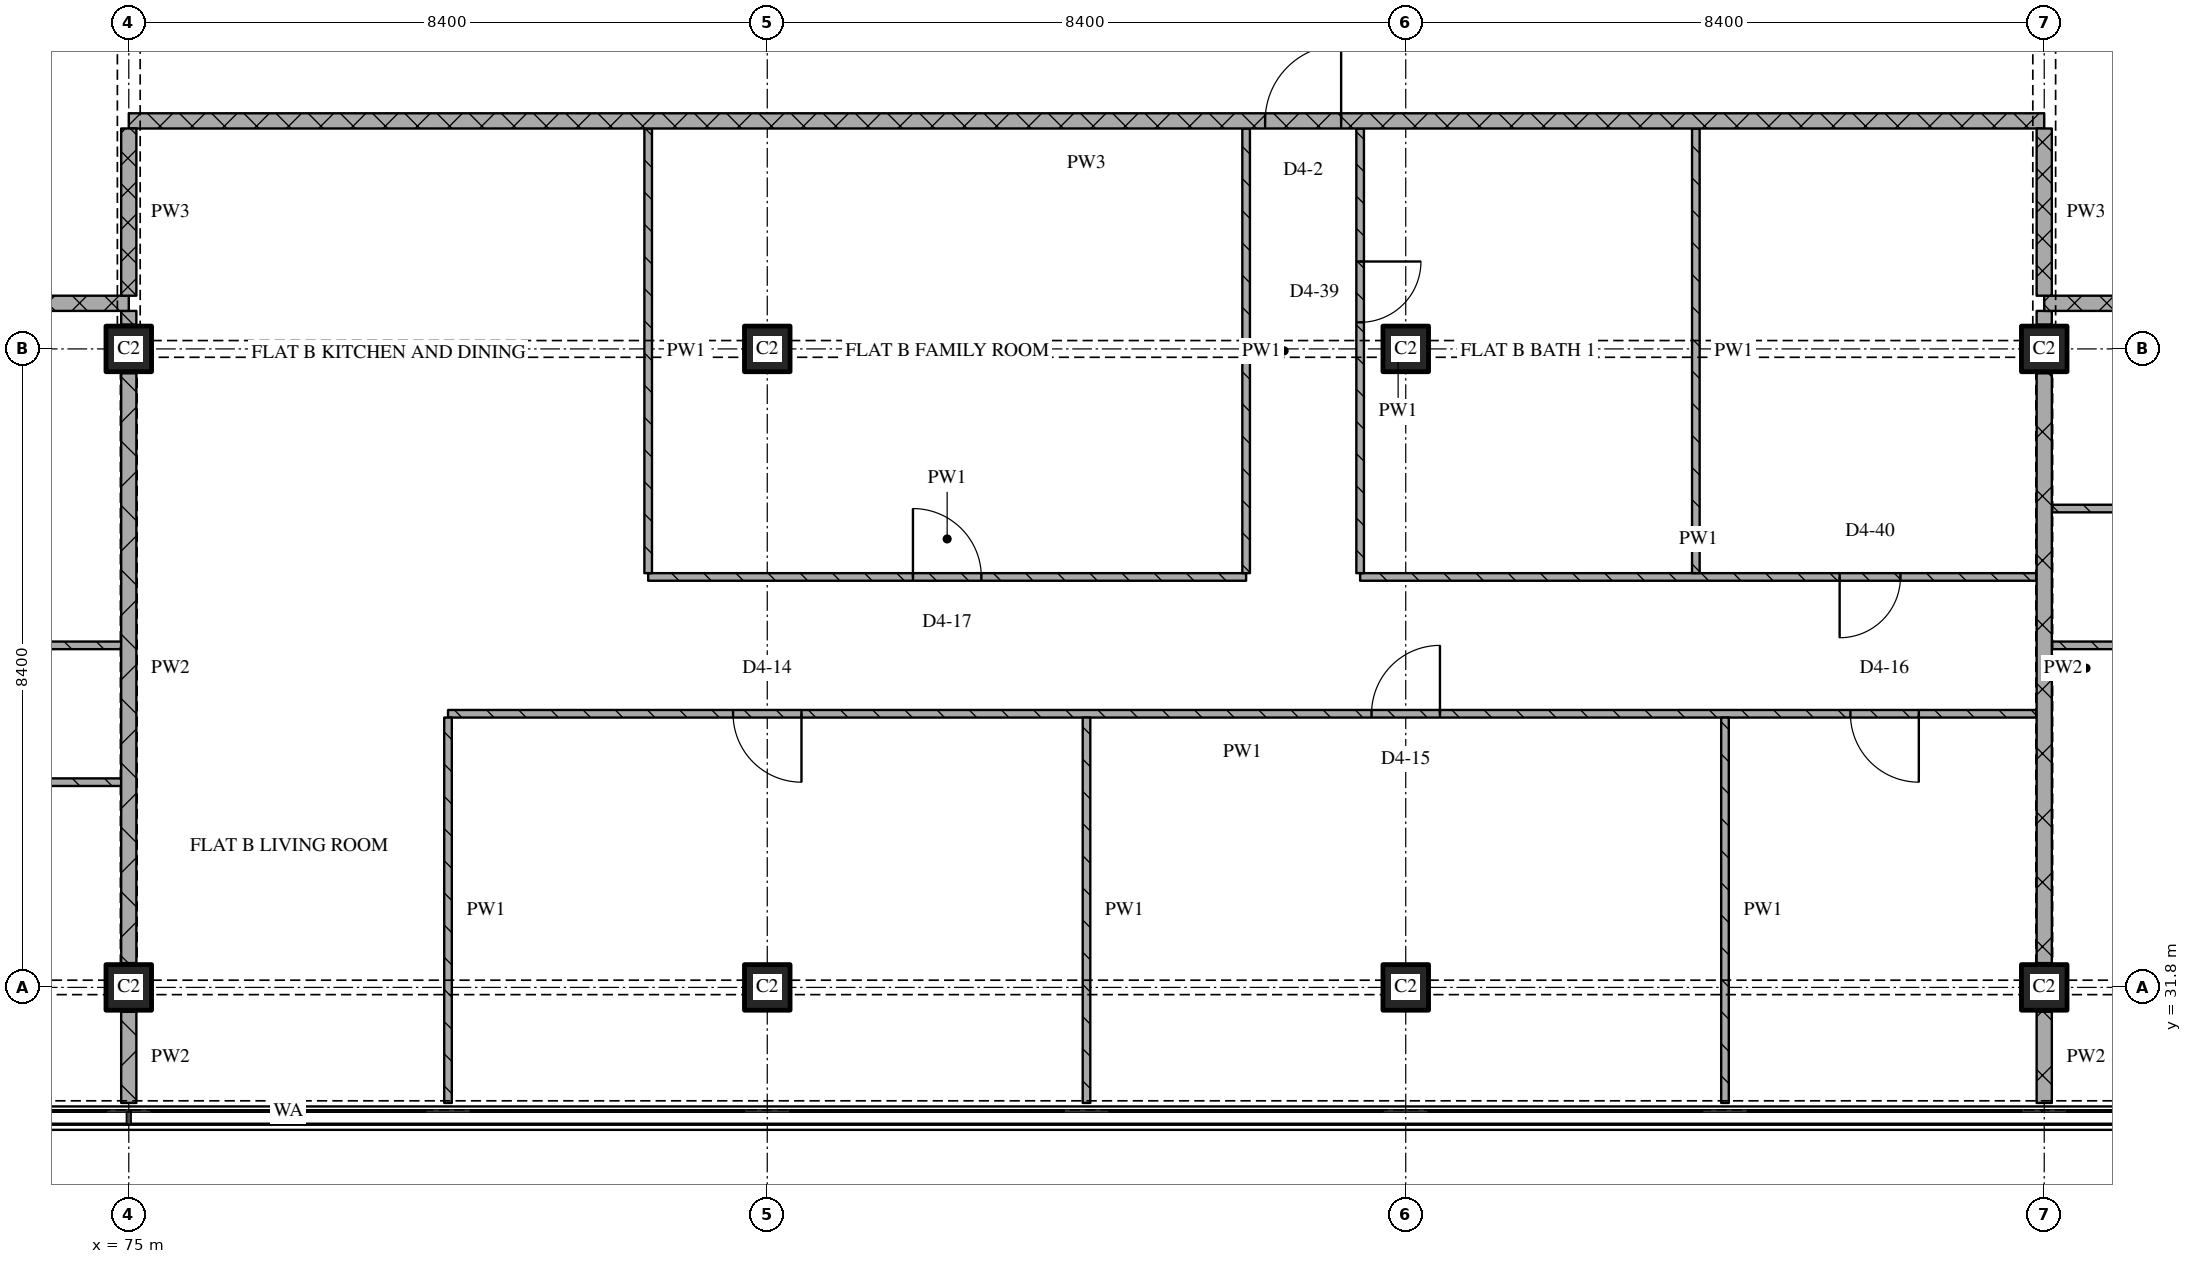
"""IFC4 building model, lengths in metres.
Left out: names, types, materials, properties, quantities, classifications, styles, units other than length and angle.
Written with IfcOpenShell. Run it as: python <this file> out.ifc"""

import sys

from ifc_helpers import new_model, si_unit, direction, frame, frame_2d, origin, origin_2d, place, context, subcontext, project, spatial, rectangle, extrude, element, fill, save


model = new_model("IFC4")
c1 = context("Model", 3, precision=1e-05, world=origin(), true_north=direction((0.0, 1.0)))
c2 = subcontext(c1, "Body", "Model", "MODEL_VIEW")
j1 = project(units=[si_unit("LENGTHUNIT", "METRE"), si_unit("PLANEANGLEUNIT", "RADIAN")], contexts=[c1])
p1 = place(None, origin())
s1 = spatial("IfcSite", under=j1, at=p1, CompositionType="ELEMENT")
p2 = place(p1, origin())
s2 = spatial("IfcBuilding", under=s1, at=p2, CompositionType="ELEMENT")
p3 = place(p2, frame((0.0, 0.0, 237.9)))
s3 = spatial("IfcBuildingStorey", under=s2, at=p3, CompositionType="ELEMENT", Elevation=237.9)
for number, where, z_axis, x_axis in (
    (1, (75.0, 31.8, 0.0), (0.0, 0.0, 1.0), (1.0, 0.0, 0.0)),
    (2, (75.0, 40.2, 0.0), (0.0, 0.0, 1.0), (1.0, 0.0, 0.0)),
    (3, (83.4, 31.8, 0.0), (0.0, 0.0, 1.0), (1.0, 0.0, 0.0)),
    (4, (83.4, 40.2, 0.0), (0.0, 0.0, 1.0), (1.0, 0.0, 0.0)),
    (5, (91.8, 31.8, 0.0), (0.0, 0.0, 1.0), (1.0, 0.0, 0.0)),
    (6, (91.8, 40.2, 0.0), (0.0, 0.0, 1.0), (1.0, 0.0, 0.0)),
    (7, (100.2, 31.8, 0.0), (0.0, 0.0, 1.0), (1.0, 0.0, 0.0)),
    (8, (100.2, 40.2, 0.0), (0.0, 0.0, 1.0), (1.0, 0.0, 0.0)),
):
    element("IfcColumn", number, at=place(p3, frame(where, z_axis=z_axis, x_axis=x_axis)), inside=s3, PredefinedType="COLUMN", context=c2, shape_type="SweptSolid", body=[
        extrude(rectangle(XDim=0.6, YDim=0.6, at=origin_2d()), origin(), (0.0, 0.0, 1.0), 3.6),
    ])
p4 = place(p3, frame((74.9, 34.5, 0.0), z_axis=(0.0, 0.0, 1.0), x_axis=(-1.0, 0.0, 0.0)))
e9 = element("IfcWall", 9, at=p4, inside=s3, PredefinedType="PARTITIONING", context=c2, shape_type="SweptSolid", body=[
    extrude(rectangle(XDim=16.7, YDim=0.1, at=frame_2d((8.35, 0.0))), origin(), (0.0, 0.0, 1.0), 3.32),
])
p5 = place(p4, frame((3.65, 0.0, 0.0)))
e10 = element("IfcOpeningElement", 10, at=p5, cuts=e9, PredefinedType="OPENING", context=c2, shape_type="SweptSolid", body=[
    extrude(rectangle(XDim=0.9, YDim=2.1, at=frame_2d((0.45, 1.05))), frame((0.0, 0.06, 0.0), z_axis=(0.0, -1.0, 0.0), x_axis=(1.0, 0.0, 0.0)), (0.0, 0.0, 1.0), 0.12),
])
p6 = place(p4, frame((12.05, 0.0, 0.0)))
e11 = element("IfcOpeningElement", 11, at=p6, cuts=e9, PredefinedType="OPENING", context=c2, shape_type="SweptSolid", body=[
    extrude(rectangle(XDim=0.9, YDim=2.1, at=frame_2d((0.45, 1.05))), frame((0.0, 0.06, 0.0), z_axis=(0.0, -1.0, 0.0), x_axis=(1.0, 0.0, 0.0)), (0.0, 0.0, 1.0), 0.12),
])
p7 = place(p3, frame((100.1, 35.4, 0.0), z_axis=(0.0, 0.0, 1.0), x_axis=(-1.0, 0.0, 0.0)))
e12 = element("IfcWall", 12, at=p7, inside=s3, PredefinedType="PARTITIONING", context=c2, shape_type="SweptSolid", body=[
    extrude(rectangle(XDim=20.9, YDim=0.1, at=frame_2d((10.45, 0.0))), origin(), (0.0, 0.0, 1.0), 3.32),
])
p8 = place(p7, frame((1.55, 0.0, 0.0)))
e13 = element("IfcOpeningElement", 13, at=p8, cuts=e12, PredefinedType="OPENING", context=c2, shape_type="SweptSolid", body=[
    extrude(rectangle(XDim=0.9, YDim=2.1, at=frame_2d((0.45, 1.05))), frame((0.0, 0.06, 0.0), z_axis=(0.0, -1.0, 0.0), x_axis=(1.0, 0.0, 0.0)), (0.0, 0.0, 1.0), 0.12),
])
p9 = place(p7, frame((7.85, 0.0, 0.0)))
e14 = element("IfcOpeningElement", 14, at=p9, cuts=e12, PredefinedType="OPENING", context=c2, shape_type="SweptSolid", body=[
    extrude(rectangle(XDim=0.9, YDim=2.1, at=frame_2d((0.45, 1.05))), frame((0.0, 0.06, 0.0), z_axis=(0.0, -1.0, 0.0), x_axis=(1.0, 0.0, 0.0)), (0.0, 0.0, 1.0), 0.12),
])
p10 = place(p7, frame((16.25, 0.0, 0.0)))
e15 = element("IfcOpeningElement", 15, at=p10, cuts=e12, PredefinedType="OPENING", context=c2, shape_type="SweptSolid", body=[
    extrude(rectangle(XDim=0.9, YDim=2.1, at=frame_2d((0.45, 1.05))), frame((0.0, 0.06, 0.0), z_axis=(0.0, -1.0, 0.0), x_axis=(1.0, 0.0, 0.0)), (0.0, 0.0, 1.0), 0.12),
])
p11 = place(p3, frame((65.1, 36.3, 0.0), z_axis=(0.0, 0.0, 1.0), x_axis=(1.0, 0.0, 0.0)))
e16 = element("IfcWall", 16, at=p11, inside=s3, PredefinedType="PARTITIONING", context=c2, shape_type="SweptSolid", body=[
    extrude(rectangle(XDim=9.8, YDim=0.1, at=frame_2d((4.9, 0.0))), origin(), (0.0, 0.0, 1.0), 3.32),
])
p12 = place(p11, frame((6.8, 0.0, 0.0)))
e17 = element("IfcOpeningElement", 17, at=p12, cuts=e16, PredefinedType="OPENING", context=c2, shape_type="SweptSolid", body=[
    extrude(rectangle(XDim=0.8, YDim=2.1, at=frame_2d((0.4, 1.05))), frame((0.0, 0.06, 0.0), z_axis=(0.0, -1.0, 0.0), x_axis=(1.0, 0.0, 0.0)), (0.0, 0.0, 1.0), 0.12),
])
p13 = place(p3, frame((112.8, 36.3, 0.0), z_axis=(0.0, 0.0, 1.0), x_axis=(-1.0, 0.0, 0.0)))
e18 = element("IfcWall", 18, at=p13, inside=s3, PredefinedType="PARTITIONING", context=c2, shape_type="SweptSolid", body=[
    extrude(rectangle(XDim=12.5, YDim=0.1, at=frame_2d((6.25, 0.0))), origin(), (0.0, 0.0, 1.0), 3.32),
])
p14 = place(p13, frame((10.05, 0.0, 0.0)))
e19 = element("IfcOpeningElement", 19, at=p14, cuts=e18, PredefinedType="OPENING", context=c2, shape_type="SweptSolid", body=[
    extrude(rectangle(XDim=0.9, YDim=2.1, at=frame_2d((0.45, 1.05))), frame((0.0, 0.06, 0.0), z_axis=(0.0, -1.0, 0.0), x_axis=(1.0, 0.0, 0.0)), (0.0, 0.0, 1.0), 0.12),
])
p15 = place(p3, frame((81.833, 37.2, 0.0), z_axis=(0.0, 0.0, 1.0), x_axis=(1.0, 0.0, 0.0)))
e20 = element("IfcWall", 20, at=p15, inside=s3, PredefinedType="PARTITIONING", context=c2, shape_type="SweptSolid", body=[
    extrude(rectangle(XDim=7.867, YDim=0.1, at=frame_2d((3.933, 0.0))), origin(), (0.0, 0.0, 1.0), 3.32),
])
p16 = place(p15, frame((3.483, 0.0, 0.0)))
e21 = element("IfcOpeningElement", 21, at=p16, cuts=e20, PredefinedType="OPENING", context=c2, shape_type="SweptSolid", body=[
    extrude(rectangle(XDim=0.9, YDim=2.1, at=frame_2d((0.45, 1.05))), frame((0.0, 0.06, 0.0), z_axis=(0.0, -1.0, 0.0), x_axis=(1.0, 0.0, 0.0)), (0.0, 0.0, 1.0), 0.12),
])
p17 = place(p3, frame((91.2, 37.2, 0.0), z_axis=(0.0, 0.0, 1.0), x_axis=(1.0, 0.0, 0.0)))
e22 = element("IfcWall", 22, at=p17, inside=s3, PredefinedType="PARTITIONING", context=c2, shape_type="SweptSolid", body=[
    extrude(rectangle(XDim=8.9, YDim=0.1, at=frame_2d((4.45, 0.0))), origin(), (0.0, 0.0, 1.0), 3.32),
])
p18 = place(p17, frame((6.308, 0.0, 0.0)))
e23 = element("IfcOpeningElement", 23, at=p18, cuts=e22, PredefinedType="OPENING", context=c2, shape_type="SweptSolid", body=[
    extrude(rectangle(XDim=0.8, YDim=2.1, at=frame_2d((0.4, 1.05))), frame((0.0, 0.06, 0.0), z_axis=(0.0, -1.0, 0.0), x_axis=(1.0, 0.0, 0.0)), (0.0, 0.0, 1.0), 0.12),
])
p19 = place(p3, frame((100.3, 38.1, 0.0), z_axis=(0.0, 0.0, 1.0), x_axis=(1.0, 0.0, 0.0)))
e24 = element("IfcWall", 24, at=p19, inside=s3, PredefinedType="PARTITIONING", context=c2, shape_type="SweptSolid", body=[
    extrude(rectangle(XDim=8.6, YDim=0.1, at=frame_2d((4.3, 0.0))), origin(), (0.0, 0.0, 1.0), 3.32),
])
p20 = place(p19, frame((1.75, 0.0, 0.0)))
e25 = element("IfcOpeningElement", 25, at=p20, cuts=e24, PredefinedType="OPENING", context=c2, shape_type="SweptSolid", body=[
    extrude(rectangle(XDim=0.8, YDim=2.1, at=frame_2d((0.4, 1.05))), frame((0.0, 0.06, 0.0), z_axis=(0.0, -1.0, 0.0), x_axis=(1.0, 0.0, 0.0)), (0.0, 0.0, 1.0), 0.12),
])
p21 = place(p3, frame((75.0, 40.8, 0.0), z_axis=(0.0, 0.0, 1.0), x_axis=(-1.0, 0.0, 0.0)))
e26 = element("IfcWall", 26, at=p21, inside=s3, PredefinedType="PARTITIONING", context=c2, shape_type="SweptSolid", body=[
    extrude(rectangle(XDim=24.38, YDim=0.2, at=frame_2d((12.19, 0.0))), origin(), (0.0, 0.0, 1.0), 3.32),
])
p22 = place(p21, frame((10.15, 0.0, 0.0)))
e27 = element("IfcOpeningElement", 27, at=p22, cuts=e26, PredefinedType="OPENING", context=c2, shape_type="SweptSolid", body=[
    extrude(rectangle(XDim=1.0, YDim=2.1, at=frame_2d((0.5, 1.05))), frame((0.0, 0.11, 0.0), z_axis=(0.0, -1.0, 0.0), x_axis=(1.0, 0.0, 0.0)), (0.0, 0.0, 1.0), 0.22),
])
p23 = place(p3, frame((124.58, 40.8, 0.0), z_axis=(0.0, 0.0, 1.0), x_axis=(-1.0, 0.0, 0.0)))
e28 = element("IfcWall", 28, at=p23, inside=s3, PredefinedType="PARTITIONING", context=c2, shape_type="SweptSolid", body=[
    extrude(rectangle(XDim=24.38, YDim=0.2, at=frame_2d((12.19, 0.0))), origin(), (0.0, 0.0, 1.0), 3.32),
])
p24 = place(p23, frame((14.43, 0.0, 0.0)))
e29 = element("IfcOpeningElement", 29, at=p24, cuts=e28, PredefinedType="OPENING", context=c2, shape_type="SweptSolid", body=[
    extrude(rectangle(XDim=1.0, YDim=2.1, at=frame_2d((0.5, 1.05))), frame((0.0, 0.11, 0.0), z_axis=(0.0, -1.0, 0.0), x_axis=(1.0, 0.0, 0.0)), (0.0, 0.0, 1.0), 0.22),
])
p25 = place(p3, frame((100.2, 43.2, 0.0), z_axis=(0.0, 0.0, 1.0), x_axis=(-1.0, 0.0, 0.0)))
e30 = element("IfcWall", 30, at=p25, inside=s3, PredefinedType="PARTITIONING", context=c2, shape_type="SweptSolid", body=[
    extrude(rectangle(XDim=25.2, YDim=0.2, at=frame_2d((12.6, 0.0))), origin(), (0.0, 0.0, 1.0), 3.32),
])
p26 = place(p25, frame((9.25, 0.0, 0.0)))
e31 = element("IfcOpeningElement", 31, at=p26, cuts=e30, PredefinedType="OPENING", context=c2, shape_type="SweptSolid", body=[
    extrude(rectangle(XDim=1.0, YDim=2.1, at=frame_2d((0.5, 1.05))), frame((0.0, 0.11, 0.0), z_axis=(0.0, -1.0, 0.0), x_axis=(1.0, 0.0, 0.0)), (0.0, 0.0, 1.0), 0.22),
])
p27 = place(p3, frame((75.0, 43.1, 0.0), z_axis=(0.0, 0.0, 1.0), x_axis=(0.0, -1.0, 0.0)))
e32 = element("IfcWall", 32, at=p27, inside=s3, PredefinedType="PARTITIONING", context=c2, shape_type="SweptSolid", body=[
    extrude(rectangle(XDim=2.2, YDim=0.2, at=frame_2d((1.1, 0.0))), origin(), (0.0, 0.0, 1.0), 2.53),
])
p28 = place(p3, frame((75.0, 31.48, 0.0), z_axis=(0.0, 0.0, 1.0), x_axis=(0.0, -1.0, 0.0)))
e33 = element("IfcWall", 33, at=p28, inside=s3, PredefinedType="PARTITIONING", context=c2, shape_type="SweptSolid", body=[
    extrude(rectangle(XDim=1.2, YDim=0.2, at=frame_2d((0.6, 0.0))), origin(), (0.0, 0.0, 1.0), 3.32),
])
p29 = place(p3, frame((75.0, 39.88, 0.0), z_axis=(0.0, 0.0, 1.0), x_axis=(0.0, -1.0, 0.0)))
e34 = element("IfcWall", 34, at=p29, inside=s3, PredefinedType="PARTITIONING", context=c2, shape_type="SweptSolid", body=[
    extrude(rectangle(XDim=7.76, YDim=0.2, at=frame_2d((3.88, 0.0))), origin(), (0.0, 0.0, 1.0), 2.72),
])
p30 = place(p3, frame((75.0, 40.7, 0.0), z_axis=(0.0, 0.0, 1.0), x_axis=(0.0, -1.0, 0.0)))
e35 = element("IfcWall", 35, at=p30, inside=s3, PredefinedType="PARTITIONING", context=c2, shape_type="SweptSolid", body=[
    extrude(rectangle(XDim=0.18, YDim=0.2, at=frame_2d((0.09, 0.0))), origin(), (0.0, 0.0, 1.0), 3.32),
])
p31 = place(p3, frame((79.2, 35.35, 0.0), z_axis=(0.0, 0.0, 1.0), x_axis=(0.0, -1.0, 0.0)))
e36 = element("IfcWall", 36, at=p31, inside=s3, PredefinedType="PARTITIONING", context=c2, shape_type="SweptSolid", body=[
    extrude(rectangle(XDim=5.07, YDim=0.1, at=frame_2d((2.535, 0.0))), origin(), (0.0, 0.0, 1.0), 3.32),
])
p32 = place(p3, frame((81.833, 43.1, 0.0), z_axis=(0.0, 0.0, 1.0), x_axis=(0.0, -1.0, 0.0)))
e37 = element("IfcWall", 37, at=p32, inside=s3, PredefinedType="PARTITIONING", context=c2, shape_type="SweptSolid", body=[
    extrude(rectangle(XDim=5.85, YDim=0.1, at=frame_2d((2.925, 0.0))), origin(), (0.0, 0.0, 1.0), 3.32),
])
p33 = place(p3, frame((87.6, 35.35, 0.0), z_axis=(0.0, 0.0, 1.0), x_axis=(0.0, -1.0, 0.0)))
e38 = element("IfcWall", 38, at=p33, inside=s3, PredefinedType="PARTITIONING", context=c2, shape_type="SweptSolid", body=[
    extrude(rectangle(XDim=5.07, YDim=0.1, at=frame_2d((2.535, 0.0))), origin(), (0.0, 0.0, 1.0), 3.32),
])
p34 = place(p3, frame((89.7, 43.1, 0.0), z_axis=(0.0, 0.0, 1.0), x_axis=(0.0, -1.0, 0.0)))
e39 = element("IfcWall", 39, at=p34, inside=s3, PredefinedType="PARTITIONING", context=c2, shape_type="SweptSolid", body=[
    extrude(rectangle(XDim=5.85, YDim=0.1, at=frame_2d((2.925, 0.0))), origin(), (0.0, 0.0, 1.0), 3.32),
])
p35 = place(p3, frame((91.2, 43.1, 0.0), z_axis=(0.0, 0.0, 1.0), x_axis=(0.0, -1.0, 0.0)))
e40 = element("IfcWall", 40, at=p35, inside=s3, PredefinedType="PARTITIONING", context=c2, shape_type="SweptSolid", body=[
    extrude(rectangle(XDim=5.85, YDim=0.1, at=frame_2d((2.925, 0.0))), origin(), (0.0, 0.0, 1.0), 3.32),
])
p36 = place(p35, frame((1.75, 0.0, 0.0)))
e41 = element("IfcOpeningElement", 41, at=p36, cuts=e40, PredefinedType="OPENING", context=c2, shape_type="SweptSolid", body=[
    extrude(rectangle(XDim=0.8, YDim=2.1, at=frame_2d((0.4, 1.05))), frame((0.0, 0.06, 0.0), z_axis=(0.0, -1.0, 0.0), x_axis=(1.0, 0.0, 0.0)), (0.0, 0.0, 1.0), 0.12),
])
p37 = place(p3, frame((95.617, 43.1, 0.0), z_axis=(0.0, 0.0, 1.0), x_axis=(0.0, -1.0, 0.0)))
e42 = element("IfcWall", 42, at=p37, inside=s3, PredefinedType="PARTITIONING", context=c2, shape_type="SweptSolid", body=[
    extrude(rectangle(XDim=5.85, YDim=0.1, at=frame_2d((2.925, 0.0))), origin(), (0.0, 0.0, 1.0), 3.32),
])
p38 = place(p3, frame((96.0, 35.35, 0.0), z_axis=(0.0, 0.0, 1.0), x_axis=(0.0, -1.0, 0.0)))
e43 = element("IfcWall", 43, at=p38, inside=s3, PredefinedType="PARTITIONING", context=c2, shape_type="SweptSolid", body=[
    extrude(rectangle(XDim=5.07, YDim=0.1, at=frame_2d((2.535, 0.0))), origin(), (0.0, 0.0, 1.0), 3.32),
])
p39 = place(p3, frame((100.2, 43.1, 0.0), z_axis=(0.0, 0.0, 1.0), x_axis=(0.0, -1.0, 0.0)))
e44 = element("IfcWall", 44, at=p39, inside=s3, PredefinedType="PARTITIONING", context=c2, shape_type="SweptSolid", body=[
    extrude(rectangle(XDim=2.2, YDim=0.2, at=frame_2d((1.1, 0.0))), origin(), (0.0, 0.0, 1.0), 2.53),
])
p40 = place(p3, frame((100.2, 31.48, 0.0), z_axis=(0.0, 0.0, 1.0), x_axis=(0.0, -1.0, 0.0)))
e45 = element("IfcWall", 45, at=p40, inside=s3, PredefinedType="PARTITIONING", context=c2, shape_type="SweptSolid", body=[
    extrude(rectangle(XDim=1.2, YDim=0.2, at=frame_2d((0.6, 0.0))), origin(), (0.0, 0.0, 1.0), 3.32),
])
p41 = place(p3, frame((100.2, 39.88, 0.0), z_axis=(0.0, 0.0, 1.0), x_axis=(0.0, -1.0, 0.0)))
e46 = element("IfcWall", 46, at=p41, inside=s3, PredefinedType="PARTITIONING", context=c2, shape_type="SweptSolid", body=[
    extrude(rectangle(XDim=7.76, YDim=0.2, at=frame_2d((3.88, 0.0))), origin(), (0.0, 0.0, 1.0), 2.72),
])
p42 = place(p3, frame((100.2, 40.7, 0.0), z_axis=(0.0, 0.0, 1.0), x_axis=(0.0, -1.0, 0.0)))
e47 = element("IfcWall", 47, at=p42, inside=s3, PredefinedType="PARTITIONING", context=c2, shape_type="SweptSolid", body=[
    extrude(rectangle(XDim=0.18, YDim=0.2, at=frame_2d((0.09, 0.0))), origin(), (0.0, 0.0, 1.0), 3.32),
])
p43 = place(p8, origin())
e48 = element("IfcDoor", 48, at=p43, inside=s3, OperationType="SINGLE_SWING_LEFT", PredefinedType="DOOR", context=c2, shape_type="SweptSolid", body=[
    extrude(rectangle(XDim=0.9, YDim=2.1, at=frame_2d((0.45, 1.05))), frame((0.0, 0.025, 0.0), z_axis=(0.0, -1.0, 0.0), x_axis=(1.0, 0.0, 0.0)), (0.0, 0.0, 1.0), 0.05),
])
fill(e13, e48)
p44 = place(p9, origin())
e49 = element("IfcDoor", 49, at=p44, inside=s3, OperationType="SINGLE_SWING_RIGHT", PredefinedType="DOOR", context=c2, shape_type="SweptSolid", body=[
    extrude(rectangle(XDim=0.9, YDim=2.1, at=frame_2d((0.45, 1.05))), frame((0.0, 0.025, 0.0), z_axis=(0.0, -1.0, 0.0), x_axis=(1.0, 0.0, 0.0)), (0.0, 0.0, 1.0), 0.05),
])
fill(e14, e49)
p45 = place(p10, origin())
e50 = element("IfcDoor", 50, at=p45, inside=s3, OperationType="SINGLE_SWING_LEFT", PredefinedType="DOOR", context=c2, shape_type="SweptSolid", body=[
    extrude(rectangle(XDim=0.9, YDim=2.1, at=frame_2d((0.45, 1.05))), frame((0.0, 0.025, 0.0), z_axis=(0.0, -1.0, 0.0), x_axis=(1.0, 0.0, 0.0)), (0.0, 0.0, 1.0), 0.05),
])
fill(e15, e50)
p46 = place(p16, origin())
e51 = element("IfcDoor", 51, at=p46, inside=s3, OperationType="SINGLE_SWING_LEFT", PredefinedType="DOOR", context=c2, shape_type="SweptSolid", body=[
    extrude(rectangle(XDim=0.9, YDim=2.1, at=frame_2d((0.45, 1.05))), frame((0.0, 0.025, 0.0), z_axis=(0.0, -1.0, 0.0), x_axis=(1.0, 0.0, 0.0)), (0.0, 0.0, 1.0), 0.05),
])
fill(e21, e51)
p47 = place(p18, origin())
e52 = element("IfcDoor", 52, at=p47, inside=s3, OperationType="SINGLE_SWING_RIGHT", PredefinedType="DOOR", context=c2, shape_type="SweptSolid", body=[
    extrude(rectangle(XDim=0.8, YDim=2.1, at=frame_2d((0.4, 1.05))), frame((0.0, 0.025, 0.0), z_axis=(0.0, -1.0, 0.0), x_axis=(1.0, 0.0, 0.0)), (0.0, 0.0, 1.0), 0.05),
])
fill(e23, e52)
p48 = place(p26, origin())
e53 = element("IfcDoor", 53, at=p48, inside=s3, OperationType="SINGLE_SWING_RIGHT", PredefinedType="DOOR", context=c2, shape_type="SweptSolid", body=[
    extrude(rectangle(XDim=1.0, YDim=2.1, at=frame_2d((0.5, 1.05))), frame((0.0, 0.025, 0.0), z_axis=(0.0, -1.0, 0.0), x_axis=(1.0, 0.0, 0.0)), (0.0, 0.0, 1.0), 0.05),
])
fill(e31, e53)
p49 = place(p36, origin())
e54 = element("IfcDoor", 54, at=p49, inside=s3, OperationType="SINGLE_SWING_LEFT", PredefinedType="DOOR", context=c2, shape_type="SweptSolid", body=[
    extrude(rectangle(XDim=0.8, YDim=2.1, at=frame_2d((0.4, 1.05))), frame((0.0, 0.025, 0.0), z_axis=(0.0, -1.0, 0.0), x_axis=(1.0, 0.0, 0.0)), (0.0, 0.0, 1.0), 0.05),
])
fill(e41, e54)
save(model, sys.argv[1])
